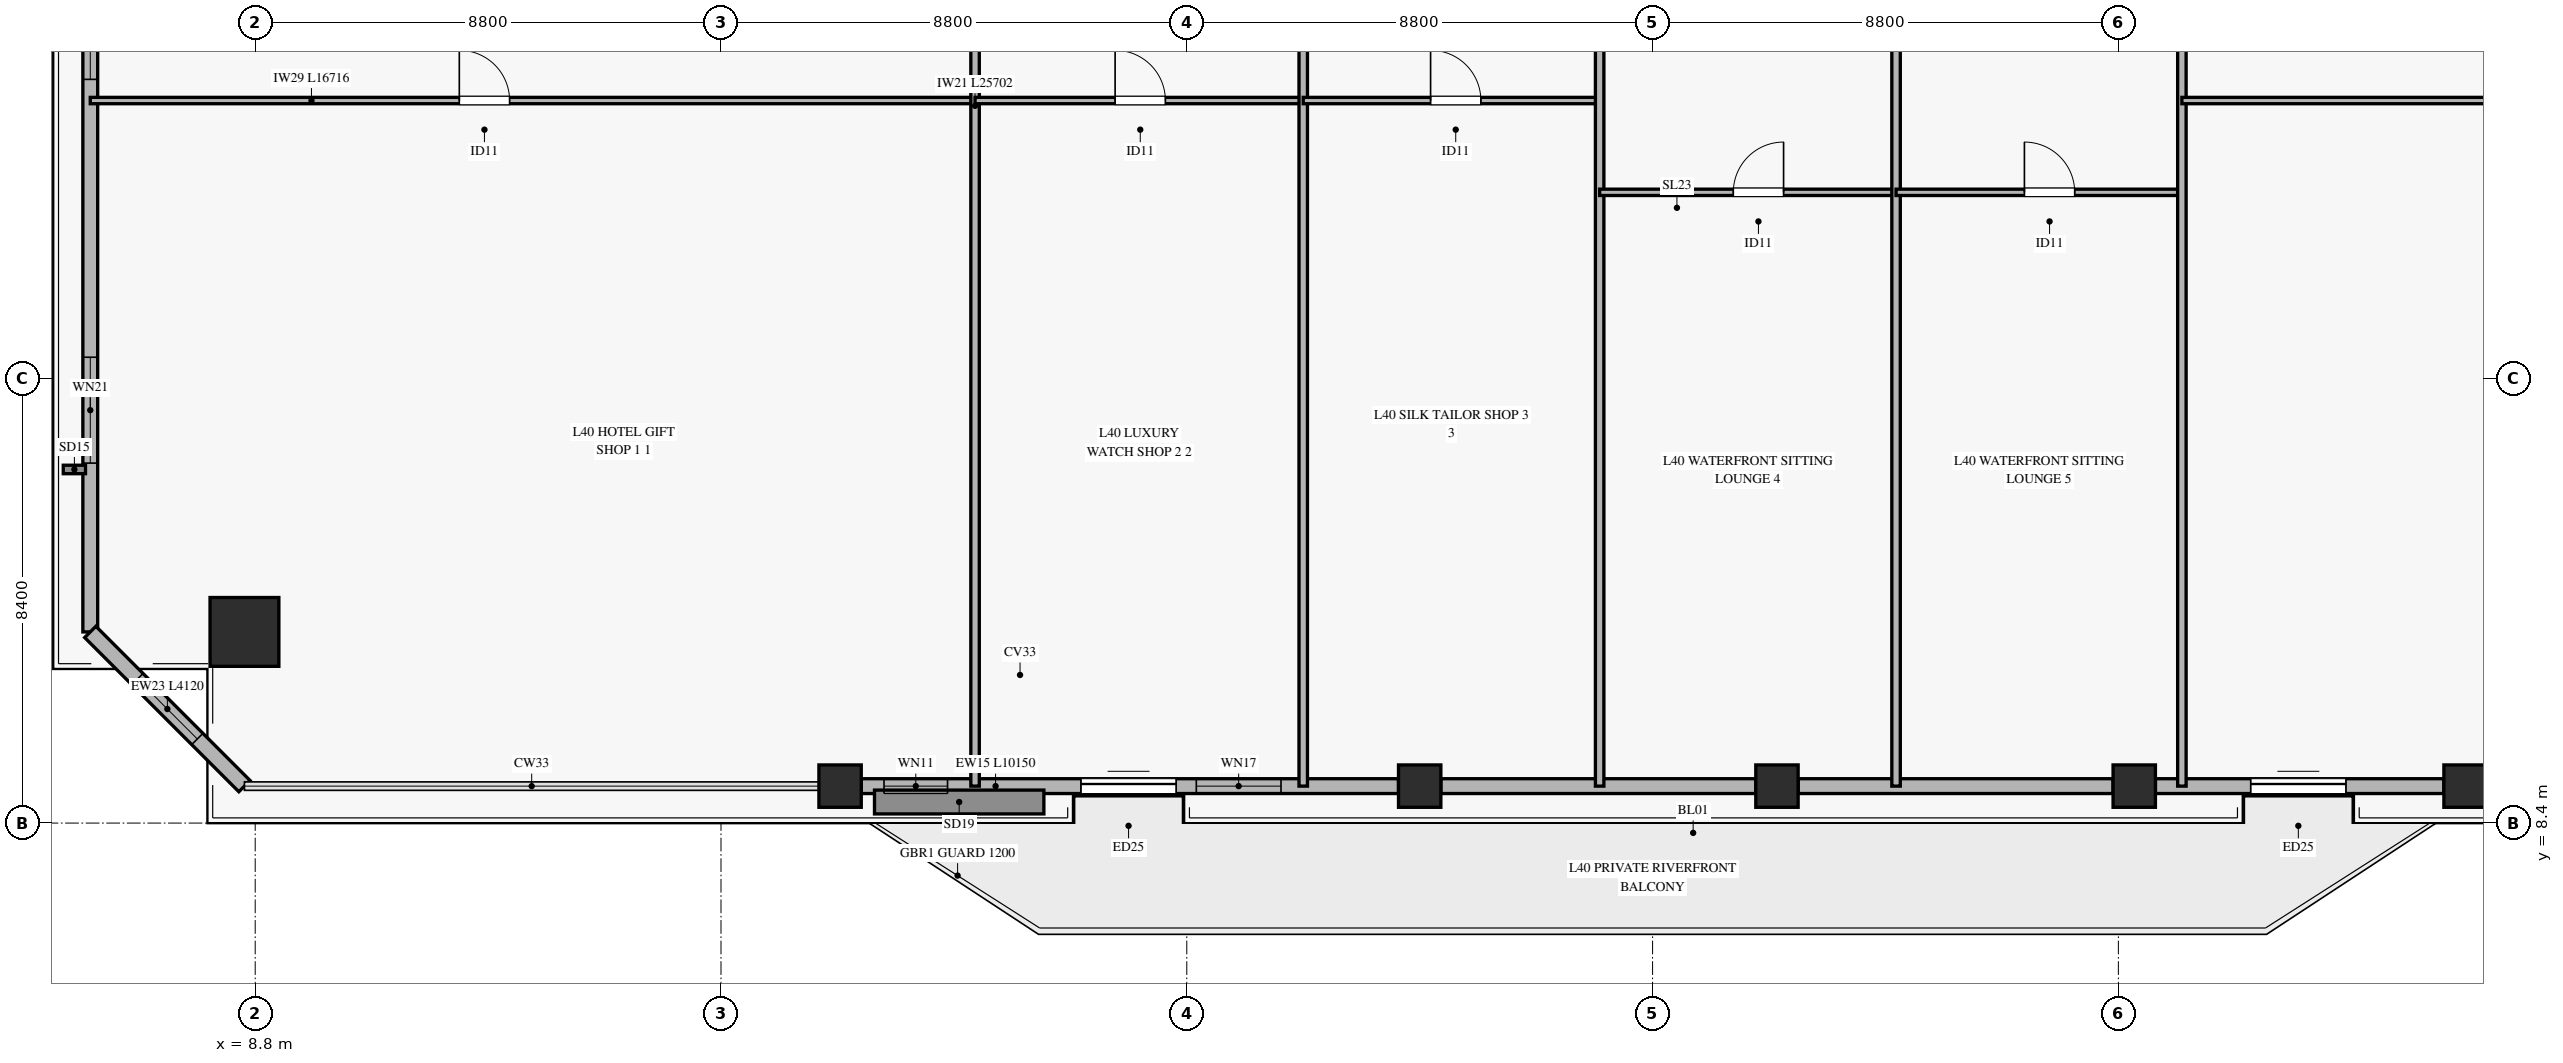
"""IFC4 building model, lengths in metres.
Left out: names, types, materials, properties, quantities, classifications, styles, units other than length and angle.
Written with IfcOpenShell. Run it as: python <this file> out.ifc"""

import sys

from ifc_helpers import new_model, si_unit, direction, frame, frame_2d, origin, origin_2d, place, context, subcontext, project, spatial, rectangle, hollow_rectangle, extrude, source, transform, mapped, element, fill, save


model = new_model("IFC4")
c1 = context("Model", 3, precision=1e-05, world=origin(), true_north=direction((0.0, 1.0)))
c2 = subcontext(c1, "Body", "Model", "MODEL_VIEW")
j1 = project(units=[si_unit("LENGTHUNIT", "METRE"), si_unit("PLANEANGLEUNIT", "RADIAN")], contexts=[c1])
p1 = place(None, origin())
s1 = spatial("IfcSite", under=j1, at=p1, CompositionType="ELEMENT")
p2 = place(p1, origin())
s2 = spatial("IfcBuilding", under=s1, at=p2, CompositionType="ELEMENT")
p3 = place(p2, frame((0.0, 0.0, 163.2)))
s3 = spatial("IfcBuildingStorey", under=s2, at=p3, CompositionType="ELEMENT", Elevation=163.2)
m1 = source(origin(), c2, "Body", "SweptSolid", [
    extrude(hollow_rectangle(XDim=1.3, YDim=1.3, WallThickness=0.06, at=origin_2d()), origin(), (0.0, 0.0, 1.0), 3.27),
])
p4 = place(p3, frame((8.597, 12.011, 0.0), z_axis=(0.0, 0.0, 1.0), x_axis=(1.0, 0.0, 0.0)))
e1 = element("IfcColumn", 1, at=p4, inside=s3, PredefinedType="COLUMN", context=c2, shape_type="MappedRepresentation", body=[
    mapped(m1, transform((0.0, 0.0, 0.0), x_axis=(1.0, 0.0, 0.0), y_axis=(0.0, 1.0, 0.0), z_axis=(0.0, 0.0, 1.0), scale=1.0)),
])
m2 = source(origin(), c2, "Body", "SweptSolid", [
    extrude(hollow_rectangle(XDim=0.8, YDim=0.8, WallThickness=0.036, at=origin_2d()), origin(), (0.0, 0.0, 1.0), 3.27),
])
for number, where, z_axis, x_axis in (
    (2, (19.85, 9.098, 0.0), (0.0, 0.0, 1.0), (1.0, 0.0, 0.0)),
    (3, (30.8, 9.098, 0.0), (0.0, 0.0, 1.0), (1.0, 0.0, 0.0)),
    (4, (37.55, 9.098, 0.0), (0.0, 0.0, 1.0), (1.0, 0.0, 0.0)),
    (5, (44.3, 9.098, 0.0), (0.0, 0.0, 1.0), (1.0, 0.0, 0.0)),
    (6, (50.55, 9.098, 0.0), (0.0, 0.0, 1.0), (1.0, 0.0, 0.0)),
):
    element("IfcColumn", number, at=place(p3, frame(where, z_axis=z_axis, x_axis=x_axis)), inside=s3, PredefinedType="COLUMN", context=c2, shape_type="MappedRepresentation", body=[
        mapped(m2, transform((0.0, 0.0, 0.0), x_axis=(1.0, 0.0, 0.0), y_axis=(0.0, 1.0, 0.0), z_axis=(0.0, 0.0, 1.0), scale=1.0)),
    ])
p5 = place(p3, frame((20.25, 9.098, 0.0), z_axis=(0.0, 0.0, 1.0), x_axis=(1.0, 0.0, 0.0)))
e7 = element("IfcWall", 7, at=p5, inside=s3, PredefinedType="SOLIDWALL", context=c2, shape_type="SweptSolid", body=[
    extrude(rectangle(XDim=10.15, YDim=0.28, at=frame_2d((5.075, 0.0))), origin(), (0.0, 0.0, 1.0), 2.75),
])
p6 = place(p5, frame((4.15, 0.0, 0.0)))
e8 = element("IfcOpeningElement", 8, at=p6, cuts=e7, PredefinedType="OPENING", context=c2, shape_type="SweptSolid", body=[
    extrude(rectangle(XDim=1.8, YDim=2.25, at=frame_2d((0.9, 1.125))), frame((0.0, 0.15, 0.0), z_axis=(0.0, -1.0, 0.0), x_axis=(1.0, 0.0, 0.0)), (0.0, 0.0, 1.0), 0.3),
])
p7 = place(p5, frame((0.43, 0.0, 0.45)))
e9 = element("IfcOpeningElement", 9, at=p7, cuts=e7, PredefinedType="OPENING", context=c2, shape_type="SweptSolid", body=[
    extrude(rectangle(XDim=1.2, YDim=2.0, at=frame_2d((0.6, 1.0))), frame((0.0, 0.15, 0.0), z_axis=(0.0, -1.0, 0.0), x_axis=(1.0, 0.0, 0.0)), (0.0, 0.0, 1.0), 0.3),
])
p8 = place(p5, frame((6.33, 0.0, 0.45)))
e10 = element("IfcOpeningElement", 10, at=p8, cuts=e7, PredefinedType="OPENING", context=c2, shape_type="SweptSolid", body=[
    extrude(rectangle(XDim=1.6, YDim=2.0, at=frame_2d((0.8, 1.0))), frame((0.0, 0.15, 0.0), z_axis=(0.0, -1.0, 0.0), x_axis=(1.0, 0.0, 0.0)), (0.0, 0.0, 1.0), 0.3),
])
for number, where, z_axis, x_axis in (
    (11, (31.2, 9.098, 0.0), (0.0, 0.0, 1.0), (1.0, 0.0, 0.0)),
    (12, (37.95, 9.098, 0.0), (0.0, 0.0, 1.0), (1.0, 0.0, 0.0)),
):
    element("IfcWall", number, at=place(p3, frame(where, z_axis=z_axis, x_axis=x_axis)), inside=s3, PredefinedType="SOLIDWALL", context=c2, shape_type="SweptSolid", body=[
        extrude(rectangle(XDim=5.95, YDim=0.28, at=frame_2d((2.975, 0.0))), origin(), (0.0, 0.0, 1.0), 2.75),
    ])
p9 = place(p3, frame((44.7, 9.098, 0.0), z_axis=(0.0, 0.0, 1.0), x_axis=(1.0, 0.0, 0.0)))
e13 = element("IfcWall", 13, at=p9, inside=s3, PredefinedType="SOLIDWALL", context=c2, shape_type="SweptSolid", body=[
    extrude(rectangle(XDim=5.45, YDim=0.28, at=frame_2d((2.725, 0.0))), origin(), (0.0, 0.0, 1.0), 2.75),
])
p10 = place(p9, frame((1.8, 0.0, 0.0)))
e14 = element("IfcOpeningElement", 14, at=p10, cuts=e13, PredefinedType="OPENING", context=c2, shape_type="SweptSolid", body=[
    extrude(rectangle(XDim=1.8, YDim=2.25, at=frame_2d((0.9, 1.125))), frame((0.0, 0.15, 0.0), z_axis=(0.0, -1.0, 0.0), x_axis=(1.0, 0.0, 0.0)), (0.0, 0.0, 1.0), 0.3),
])
p11 = place(p3, frame((5.684, 12.011, 0.0), z_axis=(0.0, 0.0, 1.0), x_axis=(0.0, 1.0, 0.0)))
e15 = element("IfcWall", 15, at=p11, inside=s3, PredefinedType="SOLIDWALL", context=c2, shape_type="SweptSolid", body=[
    extrude(rectangle(XDim=15.188, YDim=0.28, at=frame_2d((7.594, 0.0))), origin(), (0.0, 0.0, 1.0), 2.75),
])
p12 = place(p11, frame((3.189, 0.0, 0.45)))
e16 = element("IfcOpeningElement", 16, at=p12, cuts=e15, PredefinedType="OPENING", context=c2, shape_type="SweptSolid", body=[
    extrude(rectangle(XDim=2.0, YDim=2.0, at=frame_2d((1.0, 1.0))), frame((0.0, 0.15, 0.0), z_axis=(0.0, -1.0, 0.0), x_axis=(1.0, 0.0, 0.0)), (0.0, 0.0, 1.0), 0.3),
])
p13 = place(p11, frame((10.438, 0.0, 0.45)))
e17 = element("IfcOpeningElement", 17, at=p13, cuts=e15, PredefinedType="OPENING", context=c2, shape_type="SweptSolid", body=[
    extrude(rectangle(XDim=2.0, YDim=2.0, at=frame_2d((1.0, 1.0))), frame((0.0, 0.15, 0.0), z_axis=(0.0, -1.0, 0.0), x_axis=(1.0, 0.0, 0.0)), (0.0, 0.0, 1.0), 0.3),
])
p14 = place(p3, frame((5.684, 12.011, 0.0), z_axis=(0.0, 0.0, 1.0), x_axis=(0.707077148634, -0.707136412497, 0.0)))
e18 = element("IfcWall", 18, at=p14, inside=s3, PredefinedType="SOLIDWALL", context=c2, shape_type="SweptSolid", body=[
    extrude(rectangle(XDim=4.12, YDim=0.3, at=frame_2d((2.06, 0.0))), origin(), (0.0, 0.0, 1.0), 2.75),
])
p15 = place(p14, frame((1.26, 0.0, 0.45)))
e19 = element("IfcOpeningElement", 19, at=p15, cuts=e18, PredefinedType="OPENING", context=c2, shape_type="SweptSolid", body=[
    extrude(rectangle(XDim=1.6, YDim=2.0, at=frame_2d((0.8, 1.0))), frame((0.0, 0.16, 0.0), z_axis=(0.0, -1.0, 0.0), x_axis=(1.0, 0.0, 0.0)), (0.0, 0.0, 1.0), 0.32),
])
p16 = place(p3, frame((5.684, 22.049, 0.0), z_axis=(0.0, 0.0, 1.0), x_axis=(1.0, 0.0, 0.0)))
e20 = element("IfcWall", 20, at=p16, inside=s3, PredefinedType="PARTITIONING", context=c2, shape_type="SweptSolid", body=[
    extrude(rectangle(XDim=16.716, YDim=0.12, at=frame_2d((8.358, 0.0))), origin(), (0.0, 0.0, 1.0), 2.455),
])
p17 = place(p16, frame((6.972, 0.0, 0.0)))
e21 = element("IfcOpeningElement", 21, at=p17, cuts=e20, PredefinedType="OPENING", context=c2, shape_type="SweptSolid", body=[
    extrude(rectangle(XDim=0.95, YDim=2.1, at=frame_2d((0.475, 1.05))), frame((0.0, 0.07, 0.0), z_axis=(0.0, -1.0, 0.0), x_axis=(1.0, 0.0, 0.0)), (0.0, 0.0, 1.0), 0.14),
])
p18 = place(p3, frame((22.4, 9.098, 0.0), z_axis=(0.0, 0.0, 1.0), x_axis=(0.0, 1.0, 0.0)))
e22 = element("IfcWall", 22, at=p18, inside=s3, PredefinedType="PARTITIONING", context=c2, shape_type="SweptSolid", body=[
    extrude(rectangle(XDim=25.702, YDim=0.16, at=frame_2d((12.851, 0.0))), origin(), (0.0, 0.0, 1.0), 2.755),
])
p19 = place(p3, frame((22.4, 22.049, 0.0), z_axis=(0.0, 0.0, 1.0), x_axis=(1.0, 0.0, 0.0)))
e23 = element("IfcWall", 23, at=p19, inside=s3, PredefinedType="PARTITIONING", context=c2, shape_type="SweptSolid", body=[
    extrude(rectangle(XDim=6.2, YDim=0.12, at=frame_2d((3.1, 0.0))), origin(), (0.0, 0.0, 1.0), 3.27),
])
p20 = place(p19, frame((2.646, 0.0, 0.0)))
e24 = element("IfcOpeningElement", 24, at=p20, cuts=e23, PredefinedType="OPENING", context=c2, shape_type="SweptSolid", body=[
    extrude(rectangle(XDim=0.95, YDim=2.1, at=frame_2d((0.475, 1.05))), frame((0.0, 0.07, 0.0), z_axis=(0.0, -1.0, 0.0), x_axis=(1.0, 0.0, 0.0)), (0.0, 0.0, 1.0), 0.14),
])
p21 = place(p3, frame((28.6, 9.098, 0.0), z_axis=(0.0, 0.0, 1.0), x_axis=(0.0, 1.0, 0.0)))
e25 = element("IfcWall", 25, at=p21, inside=s3, PredefinedType="PARTITIONING", context=c2, shape_type="SweptSolid", body=[
    extrude(rectangle(XDim=25.702, YDim=0.16, at=frame_2d((12.851, 0.0))), origin(), (0.0, 0.0, 1.0), 2.755),
])
p22 = place(p3, frame((28.6, 22.049, 0.0), z_axis=(0.0, 0.0, 1.0), x_axis=(1.0, 0.0, 0.0)))
e26 = element("IfcWall", 26, at=p22, inside=s3, PredefinedType="PARTITIONING", context=c2, shape_type="SweptSolid", body=[
    extrude(rectangle(XDim=5.6, YDim=0.12, at=frame_2d((2.8, 0.0))), origin(), (0.0, 0.0, 1.0), 2.455),
])
p23 = place(p22, frame((2.406, 0.0, 0.0)))
e27 = element("IfcOpeningElement", 27, at=p23, cuts=e26, PredefinedType="OPENING", context=c2, shape_type="SweptSolid", body=[
    extrude(rectangle(XDim=0.95, YDim=2.1, at=frame_2d((0.475, 1.05))), frame((0.0, 0.07, 0.0), z_axis=(0.0, -1.0, 0.0), x_axis=(1.0, 0.0, 0.0)), (0.0, 0.0, 1.0), 0.14),
])
p24 = place(p3, frame((34.2, 9.098, 0.0), z_axis=(0.0, 0.0, 1.0), x_axis=(0.0, 1.0, 0.0)))
e28 = element("IfcWall", 28, at=p24, inside=s3, PredefinedType="PARTITIONING", context=c2, shape_type="SweptSolid", body=[
    extrude(rectangle(XDim=25.702, YDim=0.16, at=frame_2d((12.851, 0.0))), origin(), (0.0, 0.0, 1.0), 2.755),
])
p25 = place(p3, frame((34.2, 20.315, 0.0), z_axis=(0.0, 0.0, 1.0), x_axis=(1.0, 0.0, 0.0)))
e29 = element("IfcWall", 29, at=p25, inside=s3, PredefinedType="PARTITIONING", context=c2, shape_type="SweptSolid", body=[
    extrude(rectangle(XDim=5.6, YDim=0.12, at=frame_2d((2.8, 0.0))), origin(), (0.0, 0.0, 1.0), 2.455),
])
p26 = place(p25, frame((2.525, 0.0, 0.0)))
e30 = element("IfcOpeningElement", 30, at=p26, cuts=e29, PredefinedType="OPENING", context=c2, shape_type="SweptSolid", body=[
    extrude(rectangle(XDim=0.95, YDim=2.1, at=frame_2d((0.475, 1.05))), frame((0.0, 0.07, 0.0), z_axis=(0.0, -1.0, 0.0), x_axis=(1.0, 0.0, 0.0)), (0.0, 0.0, 1.0), 0.14),
])
p27 = place(p3, frame((39.8, 9.098, 0.0), z_axis=(0.0, 0.0, 1.0), x_axis=(0.0, 1.0, 0.0)))
e31 = element("IfcWall", 31, at=p27, inside=s3, PredefinedType="PARTITIONING", context=c2, shape_type="SweptSolid", body=[
    extrude(rectangle(XDim=25.702, YDim=0.16, at=frame_2d((12.851, 0.0))), origin(), (0.0, 0.0, 1.0), 2.755),
])
p28 = place(p3, frame((39.8, 20.315, 0.0), z_axis=(0.0, 0.0, 1.0), x_axis=(1.0, 0.0, 0.0)))
e32 = element("IfcWall", 32, at=p28, inside=s3, PredefinedType="PARTITIONING", context=c2, shape_type="SweptSolid", body=[
    extrude(rectangle(XDim=5.4, YDim=0.12, at=frame_2d((2.7, 0.0))), origin(), (0.0, 0.0, 1.0), 2.455),
])
p29 = place(p28, frame((2.425, 0.0, 0.0)))
e33 = element("IfcOpeningElement", 33, at=p29, cuts=e32, PredefinedType="OPENING", context=c2, shape_type="SweptSolid", body=[
    extrude(rectangle(XDim=0.95, YDim=2.1, at=frame_2d((0.475, 1.05))), frame((0.0, 0.07, 0.0), z_axis=(0.0, -1.0, 0.0), x_axis=(1.0, 0.0, 0.0)), (0.0, 0.0, 1.0), 0.14),
])
p30 = place(p3, frame((45.2, 9.098, 0.0), z_axis=(0.0, 0.0, 1.0), x_axis=(0.0, 1.0, 0.0)))
e34 = element("IfcWall", 34, at=p30, inside=s3, PredefinedType="PARTITIONING", context=c2, shape_type="SweptSolid", body=[
    extrude(rectangle(XDim=25.702, YDim=0.16, at=frame_2d((12.851, 0.0))), origin(), (0.0, 0.0, 1.0), 2.755),
])
p31 = place(p3, frame((45.2, 22.049, 0.0), z_axis=(0.0, 0.0, 1.0), x_axis=(1.0, 0.0, 0.0)))
e35 = element("IfcWall", 35, at=p31, inside=s3, PredefinedType="PARTITIONING", context=c2, shape_type="SweptSolid", body=[
    extrude(rectangle(XDim=19.516, YDim=0.12, at=frame_2d((9.758, 0.0))), origin(), (0.0, 0.0, 1.0), 2.455),
])
p32 = place(p31, frame((7.892, 0.0, 0.0)))
e36 = element("IfcOpeningElement", 36, at=p32, cuts=e35, PredefinedType="OPENING", context=c2, shape_type="SweptSolid", body=[
    extrude(rectangle(XDim=0.95, YDim=2.1, at=frame_2d((0.475, 1.05))), frame((0.0, 0.07, 0.0), z_axis=(0.0, -1.0, 0.0), x_axis=(1.0, 0.0, 0.0)), (0.0, 0.0, 1.0), 0.14),
])
m3 = source(origin(), c2, "Body", "SweptSolid", [
    extrude(rectangle(XDim=1.8, YDim=2.25, at=frame_2d((0.9, 1.125))), frame((0.0, 0.025, 0.0), z_axis=(0.0, -1.0, 0.0), x_axis=(1.0, 0.0, 0.0)), (0.0, 0.0, 1.0), 0.05),
])
p33 = place(p6, origin())
e37 = element("IfcDoor", 37, at=p33, inside=s3, OperationType="SLIDING_TO_LEFT", PredefinedType="DOOR", context=c2, shape_type="MappedRepresentation", body=[
    mapped(m3, transform((0.0, 0.0, 0.0), x_axis=(1.0, 0.0, 0.0), y_axis=(0.0, 1.0, 0.0), z_axis=(0.0, 0.0, 1.0), scale=1.0)),
])
fill(e8, e37)
m4 = source(origin(), c2, "Body", "SweptSolid", [
    extrude(rectangle(XDim=1.2, YDim=2.0, at=frame_2d((0.6, 1.0))), frame((0.0, 0.03, 0.0), z_axis=(0.0, -1.0, 0.0), x_axis=(1.0, 0.0, 0.0)), (0.0, 0.0, 1.0), 0.06),
])
p34 = place(p7, origin())
e38 = element("IfcWindow", 38, at=p34, inside=s3, PartitioningType="SINGLE_PANEL", PredefinedType="WINDOW", context=c2, shape_type="MappedRepresentation", body=[
    mapped(m4, transform((0.0, 0.0, 0.0), x_axis=(1.0, 0.0, 0.0), y_axis=(0.0, 1.0, 0.0), z_axis=(0.0, 0.0, 1.0), scale=1.0)),
])
fill(e9, e38)
m5 = source(origin(), c2, "Body", "SweptSolid", [
    extrude(rectangle(XDim=1.6, YDim=2.0, at=frame_2d((0.8, 1.0))), frame((0.0, 0.03, 0.0), z_axis=(0.0, -1.0, 0.0), x_axis=(1.0, 0.0, 0.0)), (0.0, 0.0, 1.0), 0.06),
])
p35 = place(p8, origin())
e39 = element("IfcWindow", 39, at=p35, inside=s3, PartitioningType="SINGLE_PANEL", PredefinedType="WINDOW", context=c2, shape_type="MappedRepresentation", body=[
    mapped(m5, transform((0.0, 0.0, 0.0), x_axis=(1.0, 0.0, 0.0), y_axis=(0.0, 1.0, 0.0), z_axis=(0.0, 0.0, 1.0), scale=1.0)),
])
fill(e10, e39)
p36 = place(p10, origin())
e40 = element("IfcDoor", 40, at=p36, inside=s3, OperationType="SLIDING_TO_LEFT", PredefinedType="DOOR", context=c2, shape_type="MappedRepresentation", body=[
    mapped(m3, transform((0.0, 0.0, 0.0), x_axis=(1.0, 0.0, 0.0), y_axis=(0.0, 1.0, 0.0), z_axis=(0.0, 0.0, 1.0), scale=1.0)),
])
fill(e14, e40)
m6 = source(origin(), c2, "Body", "SweptSolid", [
    extrude(rectangle(XDim=2.0, YDim=2.0, at=frame_2d((1.0, 1.0))), frame((0.0, 0.03, 0.0), z_axis=(0.0, -1.0, 0.0), x_axis=(1.0, 0.0, 0.0)), (0.0, 0.0, 1.0), 0.06),
])
p37 = place(p12, origin())
e41 = element("IfcWindow", 41, at=p37, inside=s3, PartitioningType="SINGLE_PANEL", PredefinedType="WINDOW", context=c2, shape_type="MappedRepresentation", body=[
    mapped(m6, transform((0.0, 0.0, 0.0), x_axis=(1.0, 0.0, 0.0), y_axis=(0.0, 1.0, 0.0), z_axis=(0.0, 0.0, 1.0), scale=1.0)),
])
fill(e16, e41)
p38 = place(p13, origin())
e42 = element("IfcWindow", 42, at=p38, inside=s3, PartitioningType="SINGLE_PANEL", PredefinedType="WINDOW", context=c2, shape_type="MappedRepresentation", body=[
    mapped(m6, transform((0.0, 0.0, 0.0), x_axis=(1.0, 0.0, 0.0), y_axis=(0.0, 1.0, 0.0), z_axis=(0.0, 0.0, 1.0), scale=1.0)),
])
fill(e17, e42)
p39 = place(p15, origin())
e43 = element("IfcWindow", 43, at=p39, inside=s3, PartitioningType="SINGLE_PANEL", PredefinedType="WINDOW", context=c2, shape_type="MappedRepresentation", body=[
    mapped(m5, transform((0.0, 0.0, 0.0), x_axis=(1.0, 0.0, 0.0), y_axis=(0.0, 1.0, 0.0), z_axis=(0.0, 0.0, 1.0), scale=1.0)),
])
fill(e19, e43)
m7 = source(origin(), c2, "Body", "SweptSolid", [
    extrude(rectangle(XDim=0.95, YDim=2.1, at=frame_2d((0.475, 1.05))), frame((0.0, 0.025, 0.0), z_axis=(0.0, -1.0, 0.0), x_axis=(1.0, 0.0, 0.0)), (0.0, 0.0, 1.0), 0.05),
])
p40 = place(p17, origin())
e44 = element("IfcDoor", 44, at=p40, inside=s3, OperationType="SINGLE_SWING_LEFT", PredefinedType="DOOR", context=c2, shape_type="MappedRepresentation", body=[
    mapped(m7, transform((0.0, 0.0, 0.0), x_axis=(1.0, 0.0, 0.0), y_axis=(0.0, 1.0, 0.0), z_axis=(0.0, 0.0, 1.0), scale=1.0)),
])
fill(e21, e44)
p41 = place(p20, origin())
e45 = element("IfcDoor", 45, at=p41, inside=s3, OperationType="SINGLE_SWING_LEFT", PredefinedType="DOOR", context=c2, shape_type="MappedRepresentation", body=[
    mapped(m7, transform((0.0, 0.0, 0.0), x_axis=(1.0, 0.0, 0.0), y_axis=(0.0, 1.0, 0.0), z_axis=(0.0, 0.0, 1.0), scale=1.0)),
])
fill(e24, e45)
p42 = place(p23, origin())
e46 = element("IfcDoor", 46, at=p42, inside=s3, OperationType="SINGLE_SWING_LEFT", PredefinedType="DOOR", context=c2, shape_type="MappedRepresentation", body=[
    mapped(m7, transform((0.0, 0.0, 0.0), x_axis=(1.0, 0.0, 0.0), y_axis=(0.0, 1.0, 0.0), z_axis=(0.0, 0.0, 1.0), scale=1.0)),
])
fill(e27, e46)
p43 = place(p26, origin())
e47 = element("IfcDoor", 47, at=p43, inside=s3, OperationType="SINGLE_SWING_RIGHT", PredefinedType="DOOR", context=c2, shape_type="MappedRepresentation", body=[
    mapped(m7, transform((0.0, 0.0, 0.0), x_axis=(1.0, 0.0, 0.0), y_axis=(0.0, 1.0, 0.0), z_axis=(0.0, 0.0, 1.0), scale=1.0)),
])
fill(e30, e47)
p44 = place(p29, origin())
e48 = element("IfcDoor", 48, at=p44, inside=s3, OperationType="SINGLE_SWING_LEFT", PredefinedType="DOOR", context=c2, shape_type="MappedRepresentation", body=[
    mapped(m7, transform((0.0, 0.0, 0.0), x_axis=(1.0, 0.0, 0.0), y_axis=(0.0, 1.0, 0.0), z_axis=(0.0, 0.0, 1.0), scale=1.0)),
])
fill(e33, e48)
save(model, sys.argv[1])
